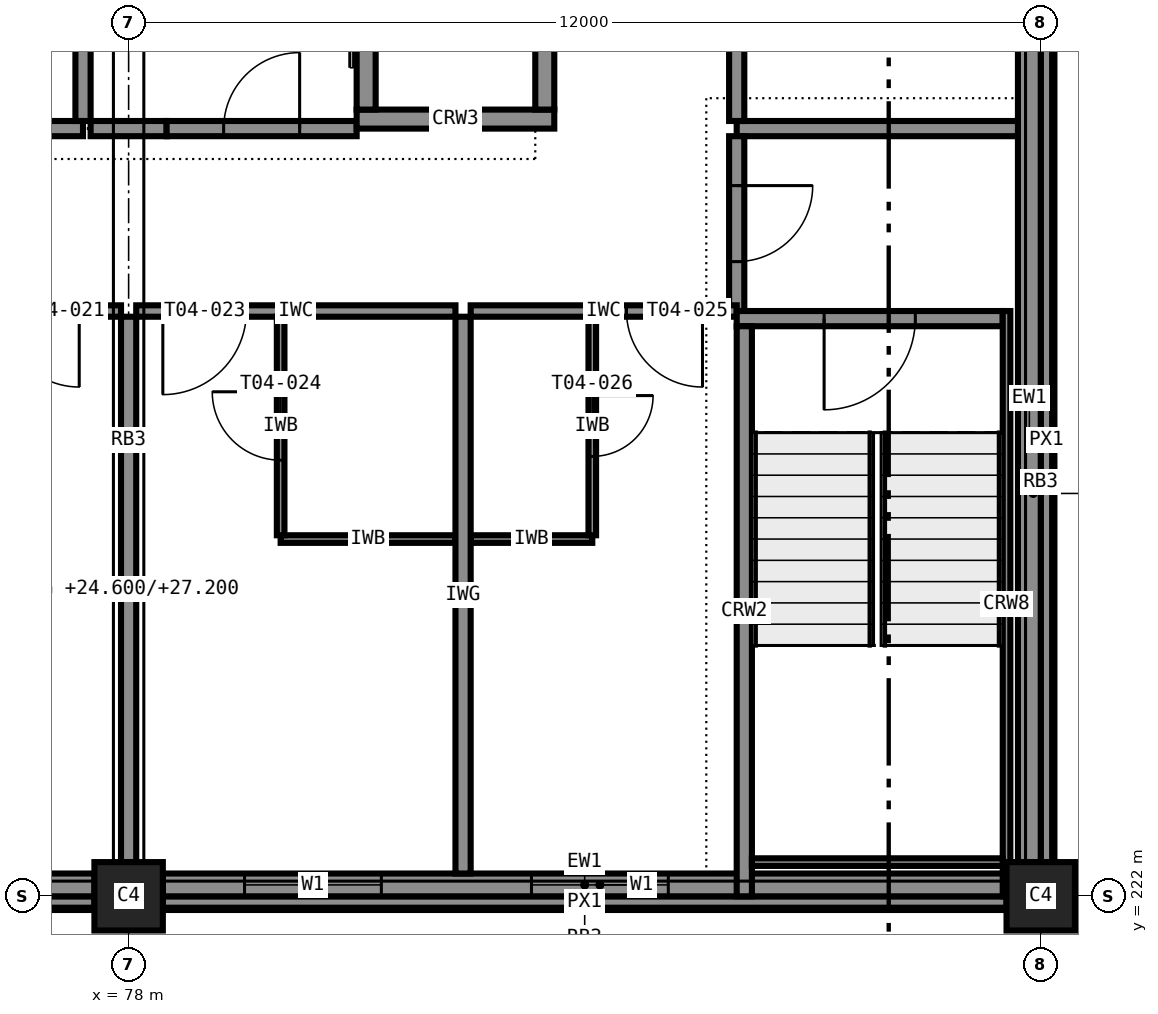
"""IFC4 building model, lengths in metres.
Left out: names, types, materials, properties, quantities, classifications, styles, units other than length and angle.
Written with IfcOpenShell. Run it as: python <this file> out.ifc"""

import sys

from ifc_helpers import new_model, si_unit, direction, frame, frame_2d, origin, origin_2d, place, context, subcontext, project, spatial, rectangle, extrude, element, fill, save


model = new_model("IFC4")
c1 = context("Model", 3, precision=1e-05, world=origin(), true_north=direction((0.0, 1.0)))
c2 = subcontext(c1, "Body", "Model", "MODEL_VIEW")
j1 = project(units=[si_unit("LENGTHUNIT", "METRE"), si_unit("PLANEANGLEUNIT", "RADIAN")], contexts=[c1])
p1 = place(None, origin())
s1 = spatial("IfcSite", under=j1, at=p1, CompositionType="ELEMENT")
p2 = place(p1, origin())
s2 = spatial("IfcBuilding", under=s1, at=p2, CompositionType="ELEMENT")
p3 = place(p2, frame((0.0, 0.0, 24.6)))
s3 = spatial("IfcBuildingStorey", under=s2, at=p3, CompositionType="ELEMENT", Elevation=24.6)
for number, where, z_axis, x_axis in (
    (1, (78.0, 222.0, 0.0), (0.0, 0.0, 1.0), (1.0, 0.0, 0.0)),
    (2, (90.0, 222.0, 0.0), (0.0, 0.0, 1.0), (1.0, 0.0, 0.0)),
):
    element("IfcColumn", number, at=place(p3, frame(where, z_axis=z_axis, x_axis=x_axis)), inside=s3, PredefinedType="COLUMN", context=c2, shape_type="SweptSolid", body=[
        extrude(rectangle(XDim=0.9, YDim=0.9, at=origin_2d()), origin(), (0.0, 0.0, 1.0), 3.6),
    ])
p4 = place(p3, frame((81.0, 232.225, 0.0), z_axis=(0.0, 0.0, 1.0), x_axis=(1.0, 0.0, 0.0)))
e3 = element("IfcWall", 3, at=p4, inside=s3, PredefinedType="SHEAR", context=c2, shape_type="SweptSolid", body=[
    extrude(rectangle(XDim=2.6, YDim=0.25, at=frame_2d((1.3, 0.0))), origin(), (0.0, 0.0, 1.0), 3.6),
])
p5 = place(p3, frame((81.125, 232.35, 0.0), z_axis=(0.0, 0.0, 1.0), x_axis=(0.0, 1.0, 0.0)))
e4 = element("IfcWall", 4, at=p5, inside=s3, PredefinedType="SHEAR", context=c2, shape_type="SweptSolid", body=[
    extrude(rectangle(XDim=3.3, YDim=0.25, at=frame_2d((1.65, 0.0))), origin(), (0.0, 0.0, 1.0), 3.6),
])
p6 = place(p5, frame((1.1, 0.0, 0.0)))
e5 = element("IfcOpeningElement", 5, at=p6, cuts=e4, PredefinedType="OPENING", context=c2, shape_type="SweptSolid", body=[
    extrude(rectangle(XDim=1.1, YDim=2.1, at=frame_2d((0.55, 1.05))), frame((0.0, 0.135, 0.0), z_axis=(0.0, -1.0, 0.0), x_axis=(1.0, 0.0, 0.0)), (0.0, 0.0, 1.0), 0.27),
])
p7 = place(p3, frame((83.475, 232.35, 0.0), z_axis=(0.0, 0.0, 1.0), x_axis=(0.0, 1.0, 0.0)))
e6 = element("IfcWall", 6, at=p7, inside=s3, PredefinedType="SHEAR", context=c2, shape_type="SweptSolid", body=[
    extrude(rectangle(XDim=3.3, YDim=0.25, at=frame_2d((1.65, 0.0))), origin(), (0.0, 0.0, 1.0), 3.6),
])
p8 = place(p3, frame((89.5, 229.6, 0.0), z_axis=(0.0, 0.0, 1.0), x_axis=(-1.0, 0.0, 0.0)))
e7 = element("IfcWall", 7, at=p8, inside=s3, PredefinedType="SHEAR", context=c2, shape_type="SweptSolid", body=[
    extrude(rectangle(XDim=3.5, YDim=0.2, at=frame_2d((1.75, 0.0))), origin(), (0.0, 0.0, 1.0), 3.6),
])
p9 = place(p8, frame((1.15, 0.0, 0.0)))
e8 = element("IfcOpeningElement", 8, at=p9, cuts=e7, PredefinedType="OPENING", context=c2, shape_type="SweptSolid", body=[
    extrude(rectangle(XDim=1.2, YDim=2.1, at=frame_2d((0.6, 1.05))), frame((0.0, 0.11, 0.0), z_axis=(0.0, -1.0, 0.0), x_axis=(1.0, 0.0, 0.0)), (0.0, 0.0, 1.0), 0.22),
])
p10 = place(p3, frame((86.1, 222.0, 0.0), z_axis=(0.0, 0.0, 1.0), x_axis=(0.0, 1.0, 0.0)))
e9 = element("IfcWall", 9, at=p10, inside=s3, PredefinedType="SHEAR", context=c2, shape_type="SweptSolid", body=[
    extrude(rectangle(XDim=7.5, YDim=0.2, at=frame_2d((3.75, 0.0))), origin(), (0.0, 0.0, 1.0), 3.6),
])
p11 = place(p3, frame((89.55, 229.7, 0.0), z_axis=(0.0, 0.0, 1.0), x_axis=(0.0, -1.0, 0.0)))
e10 = element("IfcWall", 10, at=p11, inside=s3, PredefinedType="SHEAR", context=c2, shape_type="SweptSolid", body=[
    extrude(rectangle(XDim=7.7, YDim=0.1, at=frame_2d((3.85, 0.0))), origin(), (0.0, 0.0, 1.0), 3.4),
])
p12 = place(p3, frame((89.5, 222.45, 0.0), z_axis=(0.0, 0.0, 1.0), x_axis=(-1.0, 0.0, 0.0)))
e11 = element("IfcWall", 11, at=p12, inside=s3, PredefinedType="SHEAR", context=c2, shape_type="SweptSolid", body=[
    extrude(rectangle(XDim=3.3, YDim=0.1, at=frame_2d((1.65, 0.0))), origin(), (0.0, 0.0, 1.0), 3.4),
])
p13 = place(p3, frame((66.45, 222.15, 0.0), z_axis=(0.0, 0.0, 1.0), x_axis=(1.0, 0.0, 0.0)))
e12 = element("IfcWall", 12, at=p13, inside=s3, PredefinedType="STANDARD", context=c2, shape_type="SweptSolid", body=[
    extrude(rectangle(XDim=11.1, YDim=0.3, at=frame_2d((5.55, 0.0))), origin(), (0.0, 0.0, 1.0), 2.6),
])
p14 = place(p13, frame((0.875, 0.0, 0.85)))
e13 = element("IfcOpeningElement", 13, at=p14, cuts=e12, PredefinedType="OPENING", context=c2, shape_type="SweptSolid", body=[
    extrude(rectangle(XDim=1.8, YDim=1.75, at=frame_2d((0.9, 0.875))), frame((0.0, 0.16, 0.0), z_axis=(0.0, -1.0, 0.0), x_axis=(1.0, 0.0, 0.0)), (0.0, 0.0, 1.0), 0.32),
])
p15 = place(p13, frame((4.65, 0.0, 0.85)))
e14 = element("IfcOpeningElement", 14, at=p15, cuts=e12, PredefinedType="OPENING", context=c2, shape_type="SweptSolid", body=[
    extrude(rectangle(XDim=1.8, YDim=1.75, at=frame_2d((0.9, 0.875))), frame((0.0, 0.16, 0.0), z_axis=(0.0, -1.0, 0.0), x_axis=(1.0, 0.0, 0.0)), (0.0, 0.0, 1.0), 0.32),
])
p16 = place(p13, frame((8.425, 0.0, 0.85)))
e15 = element("IfcOpeningElement", 15, at=p16, cuts=e12, PredefinedType="OPENING", context=c2, shape_type="SweptSolid", body=[
    extrude(rectangle(XDim=1.8, YDim=1.75, at=frame_2d((0.9, 0.875))), frame((0.0, 0.16, 0.0), z_axis=(0.0, -1.0, 0.0), x_axis=(1.0, 0.0, 0.0)), (0.0, 0.0, 1.0), 0.32),
])
p17 = place(p3, frame((78.45, 222.15, 0.0), z_axis=(0.0, 0.0, 1.0), x_axis=(1.0, 0.0, 0.0)))
e16 = element("IfcWall", 16, at=p17, inside=s3, PredefinedType="STANDARD", context=c2, shape_type="SweptSolid", body=[
    extrude(rectangle(XDim=11.1, YDim=0.3, at=frame_2d((5.55, 0.0))), origin(), (0.0, 0.0, 1.0), 2.6),
])
p18 = place(p17, frame((1.075, 0.0, 0.85)))
e17 = element("IfcOpeningElement", 17, at=p18, cuts=e16, PredefinedType="OPENING", context=c2, shape_type="SweptSolid", body=[
    extrude(rectangle(XDim=1.8, YDim=1.75, at=frame_2d((0.9, 0.875))), frame((0.0, 0.16, 0.0), z_axis=(0.0, -1.0, 0.0), x_axis=(1.0, 0.0, 0.0)), (0.0, 0.0, 1.0), 0.32),
])
p19 = place(p17, frame((4.85, 0.0, 0.85)))
e18 = element("IfcOpeningElement", 18, at=p19, cuts=e16, PredefinedType="OPENING", context=c2, shape_type="SweptSolid", body=[
    extrude(rectangle(XDim=1.8, YDim=1.75, at=frame_2d((0.9, 0.875))), frame((0.0, 0.16, 0.0), z_axis=(0.0, -1.0, 0.0), x_axis=(1.0, 0.0, 0.0)), (0.0, 0.0, 1.0), 0.32),
])
for number, where, z_axis, x_axis in (
    (19, (66.45, 221.925, 3.4), (0.0, 0.0, 1.0), (1.0, 0.0, 0.0)),
    (20, (78.45, 221.925, 3.4), (0.0, 0.0, 1.0), (1.0, 0.0, 0.0)),
):
    element("IfcWall", number, at=place(p3, frame(where, z_axis=z_axis, x_axis=x_axis)), inside=s3, PredefinedType="STANDARD", context=c2, shape_type="SweptSolid", body=[
        extrude(rectangle(XDim=11.1, YDim=0.15, at=frame_2d((5.55, 0.0))), origin(), (0.0, 0.0, 1.0), 0.2),
    ])
p20 = place(p3, frame((89.85, 222.45, 0.0), z_axis=(0.0, 0.0, 1.0), x_axis=(0.0, 1.0, 0.0)))
e21 = element("IfcWall", 21, at=p20, inside=s3, PredefinedType="STANDARD", context=c2, shape_type="SweptSolid", body=[
    extrude(rectangle(XDim=11.1, YDim=0.3, at=frame_2d((5.55, 0.0))), origin(), (0.0, 0.0, 1.0), 2.6),
])
p21 = place(p3, frame((90.075, 222.45, 3.4), z_axis=(0.0, 0.0, 1.0), x_axis=(0.0, 1.0, 0.0)))
e22 = element("IfcWall", 22, at=p21, inside=s3, PredefinedType="STANDARD", context=c2, shape_type="SweptSolid", body=[
    extrude(rectangle(XDim=11.1, YDim=0.15, at=frame_2d((5.55, 0.0))), origin(), (0.0, 0.0, 1.0), 0.2),
])
p22 = place(p3, frame((75.5, 232.1, 0.0), z_axis=(0.0, 0.0, 1.0), x_axis=(1.0, 0.0, 0.0)))
e23 = element("IfcWall", 23, at=p22, inside=s3, PredefinedType="PARTITIONING", context=c2, shape_type="SweptSolid", body=[
    extrude(rectangle(XDim=1.9, YDim=0.2, at=frame_2d((0.95, 0.0))), origin(), (0.0, 0.0, 1.0), 3.4),
])
p23 = place(p3, frame((77.5, 232.1, 0.0), z_axis=(0.0, 0.0, 1.0), x_axis=(1.0, 0.0, 0.0)))
e24 = element("IfcWall", 24, at=p23, inside=s3, PredefinedType="PARTITIONING", context=c2, shape_type="SweptSolid", body=[
    extrude(rectangle(XDim=1.0, YDim=0.2, at=frame_2d((0.5, 0.0))), origin(), (0.0, 0.0, 1.0), 3.4),
])
p24 = place(p3, frame((78.5, 232.1, 0.0), z_axis=(0.0, 0.0, 1.0), x_axis=(1.0, 0.0, 0.0)))
e25 = element("IfcWall", 25, at=p24, inside=s3, PredefinedType="PARTITIONING", context=c2, shape_type="SweptSolid", body=[
    extrude(rectangle(XDim=2.5, YDim=0.2, at=frame_2d((1.25, 0.0))), origin(), (0.0, 0.0, 1.0), 3.4),
])
p25 = place(p24, frame((0.75, 0.0, 0.0)))
e26 = element("IfcOpeningElement", 26, at=p25, cuts=e25, PredefinedType="OPENING", context=c2, shape_type="SweptSolid", body=[
    extrude(rectangle(XDim=1.0, YDim=2.1, at=frame_2d((0.5, 1.05))), frame((0.0, 0.11, 0.0), z_axis=(0.0, -1.0, 0.0), x_axis=(1.0, 0.0, 0.0)), (0.0, 0.0, 1.0), 0.22),
])
p26 = place(p3, frame((86.0, 232.1, 0.0), z_axis=(0.0, 0.0, 1.0), x_axis=(1.0, 0.0, 0.0)))
e27 = element("IfcWall", 27, at=p26, inside=s3, PredefinedType="PARTITIONING", context=c2, shape_type="SweptSolid", body=[
    extrude(rectangle(XDim=3.7, YDim=0.2, at=frame_2d((1.85, 0.0))), origin(), (0.0, 0.0, 1.0), 3.4),
])
p27 = place(p3, frame((77.4, 232.2, 0.0), z_axis=(0.0, 0.0, 1.0), x_axis=(0.0, 1.0, 0.0)))
e28 = element("IfcWall", 28, at=p27, inside=s3, PredefinedType="PARTITIONING", context=c2, shape_type="SweptSolid", body=[
    extrude(rectangle(XDim=3.6, YDim=0.2, at=frame_2d((1.8, 0.0))), origin(), (0.0, 0.0, 1.0), 3.4),
])
p28 = place(p3, frame((86.0, 235.8, 0.0), z_axis=(0.0, 0.0, 1.0), x_axis=(0.0, -1.0, 0.0)))
e29 = element("IfcWall", 29, at=p28, inside=s3, PredefinedType="PARTITIONING", context=c2, shape_type="SweptSolid", body=[
    extrude(rectangle(XDim=3.6, YDim=0.2, at=frame_2d((1.8, 0.0))), origin(), (0.0, 0.0, 1.0), 3.4),
])
p29 = place(p28, frame((1.35, 0.0, 0.0)))
e30 = element("IfcOpeningElement", 30, at=p29, cuts=e29, PredefinedType="OPENING", context=c2, shape_type="SweptSolid", body=[
    extrude(rectangle(XDim=0.9, YDim=2.1, at=frame_2d((0.45, 1.05))), frame((0.0, 0.11, 0.0), z_axis=(0.0, -1.0, 0.0), x_axis=(1.0, 0.0, 0.0)), (0.0, 0.0, 1.0), 0.22),
])
p30 = place(p3, frame((86.0, 232.0, 0.0), z_axis=(0.0, 0.0, 1.0), x_axis=(0.0, -1.0, 0.0)))
e31 = element("IfcWall", 31, at=p30, inside=s3, PredefinedType="PARTITIONING", context=c2, shape_type="SweptSolid", body=[
    extrude(rectangle(XDim=2.3, YDim=0.2, at=frame_2d((1.15, 0.0))), origin(), (0.0, 0.0, 1.0), 3.4),
])
p31 = place(p30, frame((0.65, 0.0, 0.0)))
e32 = element("IfcOpeningElement", 32, at=p31, cuts=e31, PredefinedType="OPENING", context=c2, shape_type="SweptSolid", body=[
    extrude(rectangle(XDim=1.0, YDim=2.1, at=frame_2d((0.5, 1.05))), frame((0.0, 0.11, 0.0), z_axis=(0.0, -1.0, 0.0), x_axis=(1.0, 0.0, 0.0)), (0.0, 0.0, 1.0), 0.22),
])
p32 = place(p3, frame((77.9, 229.7, 0.0), z_axis=(0.0, 0.0, 1.0), x_axis=(-1.0, 0.0, 0.0)))
e33 = element("IfcWall", 33, at=p32, inside=s3, PredefinedType="PARTITIONING", context=c2, shape_type="SweptSolid", body=[
    extrude(rectangle(XDim=3.8, YDim=0.15, at=frame_2d((1.9, 0.0))), origin(), (0.0, 0.0, 1.0), 3.4),
])
p33 = place(p32, frame((0.55, 0.0, 0.0)))
e34 = element("IfcOpeningElement", 34, at=p33, cuts=e33, PredefinedType="OPENING", context=c2, shape_type="SweptSolid", body=[
    extrude(rectangle(XDim=1.0, YDim=2.1, at=frame_2d((0.5, 1.05))), frame((0.0, 0.085, 0.0), z_axis=(0.0, -1.0, 0.0), x_axis=(1.0, 0.0, 0.0)), (0.0, 0.0, 1.0), 0.17),
])
p34 = place(p3, frame((82.3, 229.7, 0.0), z_axis=(0.0, 0.0, 1.0), x_axis=(-1.0, 0.0, 0.0)))
e35 = element("IfcWall", 35, at=p34, inside=s3, PredefinedType="PARTITIONING", context=c2, shape_type="SweptSolid", body=[
    extrude(rectangle(XDim=4.2, YDim=0.15, at=frame_2d((2.1, 0.0))), origin(), (0.0, 0.0, 1.0), 3.4),
])
p35 = place(p34, frame((2.75, 0.0, 0.0)))
e36 = element("IfcOpeningElement", 36, at=p35, cuts=e35, PredefinedType="OPENING", context=c2, shape_type="SweptSolid", body=[
    extrude(rectangle(XDim=1.1, YDim=2.1, at=frame_2d((0.55, 1.05))), frame((0.0, 0.085, 0.0), z_axis=(0.0, -1.0, 0.0), x_axis=(1.0, 0.0, 0.0)), (0.0, 0.0, 1.0), 0.17),
])
p36 = place(p3, frame((80.0, 226.7, 0.0), z_axis=(0.0, 0.0, 1.0), x_axis=(1.0, 0.0, 0.0)))
e37 = element("IfcWall", 37, at=p36, inside=s3, PredefinedType="PARTITIONING", context=c2, shape_type="SweptSolid", body=[
    extrude(rectangle(XDim=2.3, YDim=0.1, at=frame_2d((1.15, 0.0))), origin(), (0.0, 0.0, 1.0), 3.4),
])
p37 = place(p3, frame((80.0, 226.75, 0.0), z_axis=(0.0, 0.0, 1.0), x_axis=(0.0, 1.0, 0.0)))
e38 = element("IfcWall", 38, at=p37, inside=s3, PredefinedType="PARTITIONING", context=c2, shape_type="SweptSolid", body=[
    extrude(rectangle(XDim=2.875, YDim=0.1, at=frame_2d((1.438, 0.0))), origin(), (0.0, 0.0, 1.0), 3.4),
])
p38 = place(p37, frame((0.988, 0.0, 0.0)))
e39 = element("IfcOpeningElement", 39, at=p38, cuts=e38, PredefinedType="OPENING", context=c2, shape_type="SweptSolid", body=[
    extrude(rectangle(XDim=0.9, YDim=2.1, at=frame_2d((0.45, 1.05))), frame((0.0, 0.06, 0.0), z_axis=(0.0, -1.0, 0.0), x_axis=(1.0, 0.0, 0.0)), (0.0, 0.0, 1.0), 0.12),
])
p39 = place(p3, frame((86.0, 229.7, 0.0), z_axis=(0.0, 0.0, 1.0), x_axis=(-1.0, 0.0, 0.0)))
e40 = element("IfcWall", 40, at=p39, inside=s3, PredefinedType="PARTITIONING", context=c2, shape_type="SweptSolid", body=[
    extrude(rectangle(XDim=3.5, YDim=0.15, at=frame_2d((1.75, 0.0))), origin(), (0.0, 0.0, 1.0), 3.4),
])
p40 = place(p39, frame((0.45, 0.0, 0.0)))
e41 = element("IfcOpeningElement", 41, at=p40, cuts=e40, PredefinedType="OPENING", context=c2, shape_type="SweptSolid", body=[
    extrude(rectangle(XDim=1.0, YDim=2.1, at=frame_2d((0.5, 1.05))), frame((0.0, 0.085, 0.0), z_axis=(0.0, -1.0, 0.0), x_axis=(1.0, 0.0, 0.0)), (0.0, 0.0, 1.0), 0.17),
])
p41 = place(p3, frame((82.5, 226.7, 0.0), z_axis=(0.0, 0.0, 1.0), x_axis=(1.0, 0.0, 0.0)))
e42 = element("IfcWall", 42, at=p41, inside=s3, PredefinedType="PARTITIONING", context=c2, shape_type="SweptSolid", body=[
    extrude(rectangle(XDim=1.6, YDim=0.1, at=frame_2d((0.8, 0.0))), origin(), (0.0, 0.0, 1.0), 3.4),
])
p42 = place(p3, frame((84.1, 229.625, 0.0), z_axis=(0.0, 0.0, 1.0), x_axis=(0.0, -1.0, 0.0)))
e43 = element("IfcWall", 43, at=p42, inside=s3, PredefinedType="PARTITIONING", context=c2, shape_type="SweptSolid", body=[
    extrude(rectangle(XDim=2.875, YDim=0.1, at=frame_2d((1.438, 0.0))), origin(), (0.0, 0.0, 1.0), 3.4),
])
p43 = place(p42, frame((1.038, 0.0, 0.0)))
e44 = element("IfcOpeningElement", 44, at=p43, cuts=e43, PredefinedType="OPENING", context=c2, shape_type="SweptSolid", body=[
    extrude(rectangle(XDim=0.8, YDim=2.1, at=frame_2d((0.4, 1.05))), frame((0.0, 0.06, 0.0), z_axis=(0.0, -1.0, 0.0), x_axis=(1.0, 0.0, 0.0)), (0.0, 0.0, 1.0), 0.12),
])
p44 = place(p3, frame((78.0, 222.45, 0.0), z_axis=(0.0, 0.0, 1.0), x_axis=(0.0, 1.0, 0.0)))
e45 = element("IfcWall", 45, at=p44, inside=s3, PredefinedType="PARTITIONING", context=c2, shape_type="SweptSolid", body=[
    extrude(rectangle(XDim=7.175, YDim=0.2, at=frame_2d((3.587, 0.0))), origin(), (0.0, 0.0, 1.0), 2.6),
])
p45 = place(p3, frame((82.4, 222.3, 0.0), z_axis=(0.0, 0.0, 1.0), x_axis=(0.0, 1.0, 0.0)))
e46 = element("IfcWall", 46, at=p45, inside=s3, PredefinedType="PARTITIONING", context=c2, shape_type="SweptSolid", body=[
    extrude(rectangle(XDim=7.325, YDim=0.2, at=frame_2d((3.663, 0.0))), origin(), (0.0, 0.0, 1.0), 3.4),
])
p46 = place(p18, origin())
e47 = element("IfcWindow", 47, at=p46, inside=s3, PartitioningType="SINGLE_PANEL", PredefinedType="WINDOW", context=c2, shape_type="SweptSolid", body=[
    extrude(rectangle(XDim=1.8, YDim=1.75, at=frame_2d((0.9, 0.875))), frame((0.0, 0.03, 0.0), z_axis=(0.0, -1.0, 0.0), x_axis=(1.0, 0.0, 0.0)), (0.0, 0.0, 1.0), 0.06),
])
fill(e17, e47)
p47 = place(p19, origin())
e48 = element("IfcWindow", 48, at=p47, inside=s3, PartitioningType="SINGLE_PANEL", PredefinedType="WINDOW", context=c2, shape_type="SweptSolid", body=[
    extrude(rectangle(XDim=1.8, YDim=1.75, at=frame_2d((0.9, 0.875))), frame((0.0, 0.03, 0.0), z_axis=(0.0, -1.0, 0.0), x_axis=(1.0, 0.0, 0.0)), (0.0, 0.0, 1.0), 0.06),
])
fill(e18, e48)
p48 = place(p25, origin())
e49 = element("IfcDoor", 49, at=p48, inside=s3, OperationType="SINGLE_SWING_RIGHT", PredefinedType="DOOR", context=c2, shape_type="SweptSolid", body=[
    extrude(rectangle(XDim=1.0, YDim=2.1, at=frame_2d((0.5, 1.05))), frame((0.0, 0.025, 0.0), z_axis=(0.0, -1.0, 0.0), x_axis=(1.0, 0.0, 0.0)), (0.0, 0.0, 1.0), 0.05),
])
fill(e26, e49)
p49 = place(p31, origin())
e50 = element("IfcDoor", 50, at=p49, inside=s3, OperationType="SINGLE_SWING_LEFT", PredefinedType="DOOR", context=c2, shape_type="SweptSolid", body=[
    extrude(rectangle(XDim=1.0, YDim=2.1, at=frame_2d((0.5, 1.05))), frame((0.0, 0.025, 0.0), z_axis=(0.0, -1.0, 0.0), x_axis=(1.0, 0.0, 0.0)), (0.0, 0.0, 1.0), 0.05),
])
fill(e32, e50)
p50 = place(p33, origin())
e51 = element("IfcDoor", 51, at=p50, inside=s3, OperationType="SINGLE_SWING_LEFT", PredefinedType="DOOR", context=c2, shape_type="SweptSolid", body=[
    extrude(rectangle(XDim=1.0, YDim=2.1, at=frame_2d((0.5, 1.05))), frame((0.0, 0.025, 0.0), z_axis=(0.0, -1.0, 0.0), x_axis=(1.0, 0.0, 0.0)), (0.0, 0.0, 1.0), 0.05),
])
fill(e34, e51)
p51 = place(p35, origin())
e52 = element("IfcDoor", 52, at=p51, inside=s3, OperationType="SINGLE_SWING_RIGHT", PredefinedType="DOOR", context=c2, shape_type="SweptSolid", body=[
    extrude(rectangle(XDim=1.1, YDim=2.1, at=frame_2d((0.55, 1.05))), frame((0.0, 0.025, 0.0), z_axis=(0.0, -1.0, 0.0), x_axis=(1.0, 0.0, 0.0)), (0.0, 0.0, 1.0), 0.05),
])
fill(e36, e52)
p52 = place(p38, origin())
e53 = element("IfcDoor", 53, at=p52, inside=s3, OperationType="SINGLE_SWING_RIGHT", PredefinedType="DOOR", context=c2, shape_type="SweptSolid", body=[
    extrude(rectangle(XDim=0.9, YDim=2.1, at=frame_2d((0.45, 1.05))), frame((0.0, 0.025, 0.0), z_axis=(0.0, -1.0, 0.0), x_axis=(1.0, 0.0, 0.0)), (0.0, 0.0, 1.0), 0.05),
])
fill(e39, e53)
p53 = place(p40, origin())
e54 = element("IfcDoor", 54, at=p53, inside=s3, OperationType="SINGLE_SWING_LEFT", PredefinedType="DOOR", context=c2, shape_type="SweptSolid", body=[
    extrude(rectangle(XDim=1.0, YDim=2.1, at=frame_2d((0.5, 1.05))), frame((0.0, 0.025, 0.0), z_axis=(0.0, -1.0, 0.0), x_axis=(1.0, 0.0, 0.0)), (0.0, 0.0, 1.0), 0.05),
])
fill(e41, e54)
p54 = place(p43, origin())
e55 = element("IfcDoor", 55, at=p54, inside=s3, OperationType="SINGLE_SWING_LEFT", PredefinedType="DOOR", context=c2, shape_type="SweptSolid", body=[
    extrude(rectangle(XDim=0.8, YDim=2.1, at=frame_2d((0.4, 1.05))), frame((0.0, 0.025, 0.0), z_axis=(0.0, -1.0, 0.0), x_axis=(1.0, 0.0, 0.0)), (0.0, 0.0, 1.0), 0.05),
])
fill(e44, e55)
p55 = place(p9, origin())
e56 = element("IfcDoor", 56, at=p55, inside=s3, OperationType="SINGLE_SWING_RIGHT", PredefinedType="DOOR", context=c2, shape_type="SweptSolid", body=[
    extrude(rectangle(XDim=1.2, YDim=2.1, at=frame_2d((0.6, 1.05))), frame((0.0, 0.025, 0.0), z_axis=(0.0, -1.0, 0.0), x_axis=(1.0, 0.0, 0.0)), (0.0, 0.0, 1.0), 0.05),
])
fill(e8, e56)
save(model, sys.argv[1])
